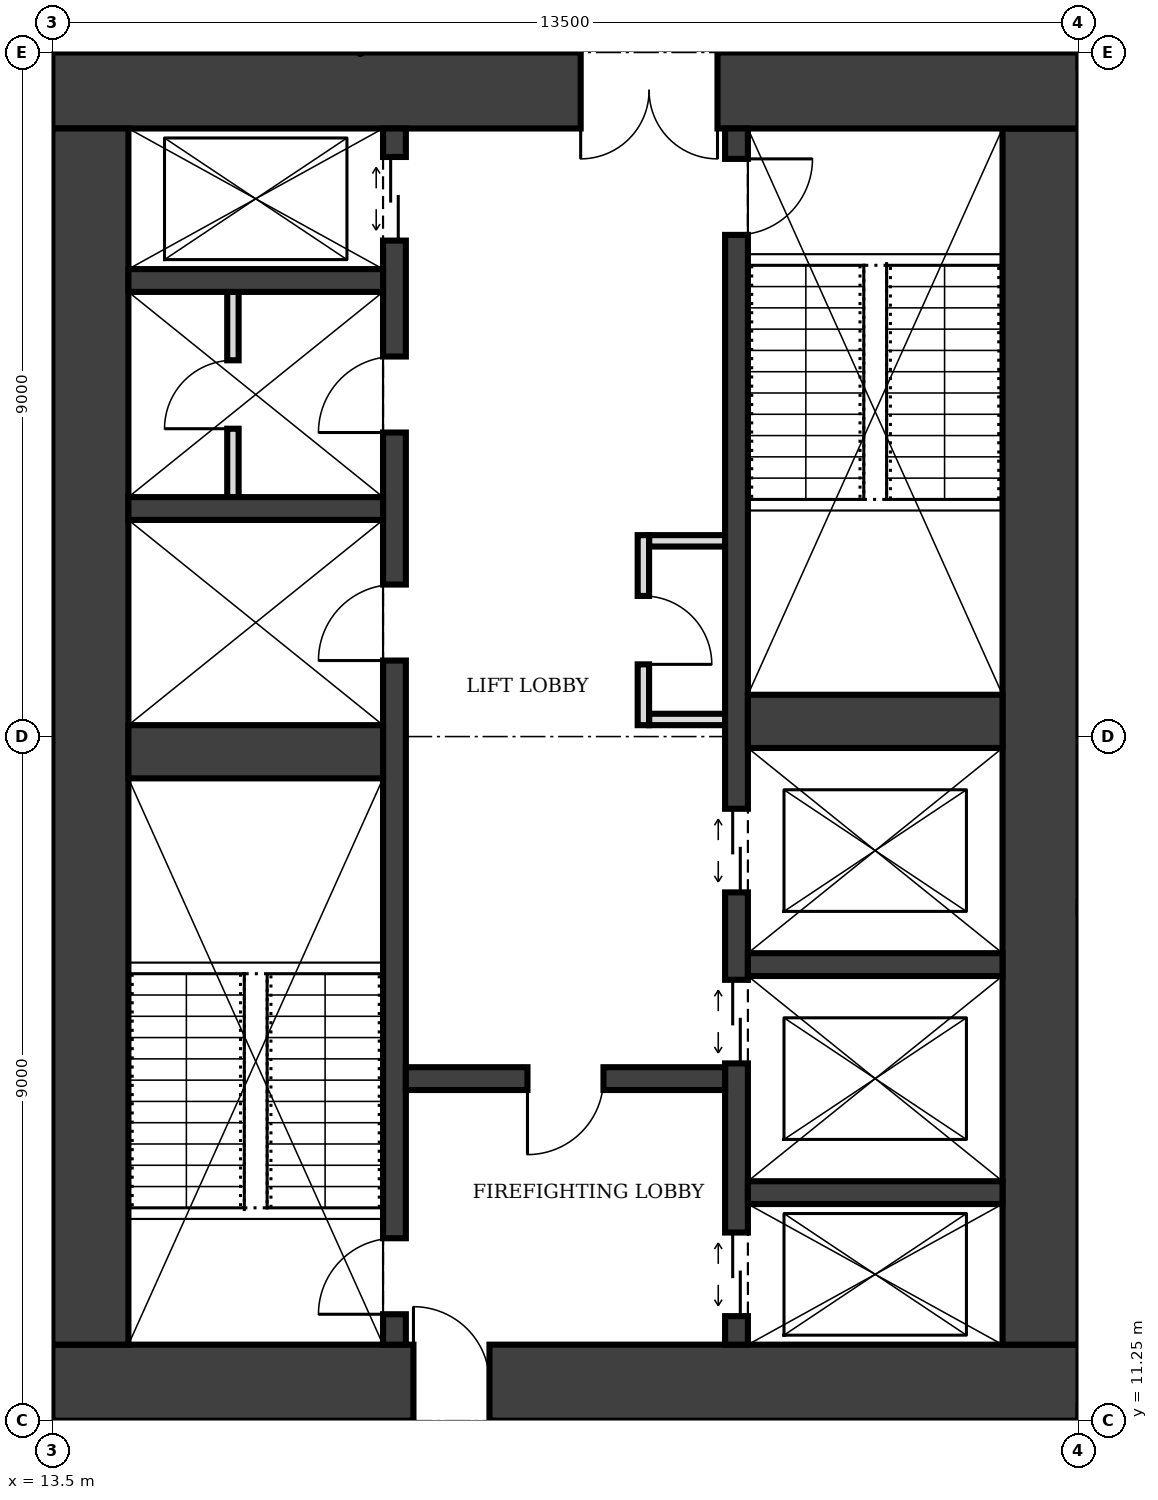
"""IFC4 building model, lengths in metres.
Left out: names, types, materials, properties, quantities, classifications, styles, units other than length and angle.
Written with IfcOpenShell. Run it as: python <this file> out.ifc"""

import sys

from ifc_helpers import new_model, si_unit, direction, frame, frame_2d, origin, place, context, subcontext, project, spatial, rectangle, extrude, element, fill, save


model = new_model("IFC4")
c1 = context("Model", 3, precision=1e-05, world=origin(), true_north=direction((0.0, 1.0)))
c2 = subcontext(c1, "Body", "Model", "MODEL_VIEW")
j1 = project(units=[si_unit("LENGTHUNIT", "METRE"), si_unit("PLANEANGLEUNIT", "RADIAN")], contexts=[c1])
p1 = place(None, origin())
s1 = spatial("IfcSite", under=j1, at=p1, CompositionType="ELEMENT")
p2 = place(p1, origin())
s2 = spatial("IfcBuilding", under=s1, at=p2, CompositionType="ELEMENT")
p3 = place(p2, frame((0.0, 0.0, 165.0)))
s3 = spatial("IfcBuildingStorey", under=s2, at=p3, CompositionType="ELEMENT", Elevation=165.0)
p4 = place(p3, frame((13.5, 11.75, 0.0), z_axis=(0.0, 0.0, 1.0), x_axis=(1.0, 0.0, 0.0)))
e1 = element("IfcWall", 1, at=p4, inside=s3, PredefinedType="SHEAR", context=c2, shape_type="SweptSolid", body=[
    extrude(rectangle(XDim=13.5, YDim=1.0, at=frame_2d((6.75, 0.0))), origin(), (0.0, 0.0, 1.0), 4.0),
])
p5 = place(p4, frame((4.75, 0.0, 0.0)))
e2 = element("IfcOpeningElement", 2, at=p5, cuts=e1, PredefinedType="OPENING", context=c2, shape_type="SweptSolid", body=[
    extrude(rectangle(XDim=1.0, YDim=2.1, at=frame_2d((0.5, 1.05))), frame((0.0, 0.51, 0.0), z_axis=(0.0, -1.0, 0.0), x_axis=(1.0, 0.0, 0.0)), (0.0, 0.0, 1.0), 1.02),
])
p6 = place(p3, frame((26.5, 12.25, 0.0), z_axis=(0.0, 0.0, 1.0), x_axis=(0.0, 1.0, 0.0)))
e3 = element("IfcWall", 3, at=p6, inside=s3, PredefinedType="SHEAR", context=c2, shape_type="SweptSolid", body=[
    extrude(rectangle(XDim=16.0, YDim=1.0, at=frame_2d((8.0, 0.0))), origin(), (0.0, 0.0, 1.0), 4.0),
])
p7 = place(p3, frame((27.0, 28.75, 0.0), z_axis=(0.0, 0.0, 1.0), x_axis=(-1.0, 0.0, 0.0)))
e4 = element("IfcWall", 4, at=p7, inside=s3, PredefinedType="SHEAR", context=c2, shape_type="SweptSolid", body=[
    extrude(rectangle(XDim=13.5, YDim=1.0, at=frame_2d((6.75, 0.0))), origin(), (0.0, 0.0, 1.0), 4.0),
])
p8 = place(p7, frame((4.75, 0.0, 0.0)))
e5 = element("IfcOpeningElement", 5, at=p8, cuts=e4, PredefinedType="OPENING", context=c2, shape_type="SweptSolid", body=[
    extrude(rectangle(XDim=1.8, YDim=2.1, at=frame_2d((0.9, 1.05))), frame((0.0, 0.51, 0.0), z_axis=(0.0, -1.0, 0.0), x_axis=(1.0, 0.0, 0.0)), (0.0, 0.0, 1.0), 1.02),
])
p9 = place(p3, frame((14.0, 28.25, 0.0), z_axis=(0.0, 0.0, 1.0), x_axis=(0.0, -1.0, 0.0)))
e6 = element("IfcWall", 6, at=p9, inside=s3, PredefinedType="SHEAR", context=c2, shape_type="SweptSolid", body=[
    extrude(rectangle(XDim=16.0, YDim=1.0, at=frame_2d((8.0, 0.0))), origin(), (0.0, 0.0, 1.0), 4.0),
])
p10 = place(p3, frame((18.0, 12.25, 0.0), z_axis=(0.0, 0.0, 1.0), x_axis=(0.0, 1.0, 0.0)))
e7 = element("IfcWall", 7, at=p10, inside=s3, PredefinedType="SHEAR", context=c2, shape_type="SweptSolid", body=[
    extrude(rectangle(XDim=16.0, YDim=0.3, at=frame_2d((8.0, 0.0))), origin(), (0.0, 0.0, 1.0), 4.0),
])
p11 = place(p10, frame((0.4, 0.0, 0.0)))
e8 = element("IfcOpeningElement", 8, at=p11, cuts=e7, PredefinedType="OPENING", context=c2, shape_type="SweptSolid", body=[
    extrude(rectangle(XDim=1.0, YDim=2.1, at=frame_2d((0.5, 1.05))), frame((0.0, 0.16, 0.0), z_axis=(0.0, -1.0, 0.0), x_axis=(1.0, 0.0, 0.0)), (0.0, 0.0, 1.0), 0.32),
])
p12 = place(p10, frame((14.525, 0.0, 0.0)))
e9 = element("IfcOpeningElement", 9, at=p12, cuts=e7, PredefinedType="OPENING", context=c2, shape_type="SweptSolid", body=[
    extrude(rectangle(XDim=1.1, YDim=2.1, at=frame_2d((0.55, 1.05))), frame((0.0, 0.16, 0.0), z_axis=(0.0, -1.0, 0.0), x_axis=(1.0, 0.0, 0.0)), (0.0, 0.0, 1.0), 0.32),
])
p13 = place(p10, frame((9.0, 0.0, 0.0)))
e10 = element("IfcOpeningElement", 10, at=p13, cuts=e7, PredefinedType="OPENING", context=c2, shape_type="SweptSolid", body=[
    extrude(rectangle(XDim=1.0, YDim=2.1, at=frame_2d((0.5, 1.05))), frame((0.0, 0.16, 0.0), z_axis=(0.0, -1.0, 0.0), x_axis=(1.0, 0.0, 0.0)), (0.0, 0.0, 1.0), 0.32),
])
p14 = place(p10, frame((12.0, 0.0, 0.0)))
e11 = element("IfcOpeningElement", 11, at=p14, cuts=e7, PredefinedType="OPENING", context=c2, shape_type="SweptSolid", body=[
    extrude(rectangle(XDim=1.0, YDim=2.1, at=frame_2d((0.5, 1.05))), frame((0.0, 0.16, 0.0), z_axis=(0.0, -1.0, 0.0), x_axis=(1.0, 0.0, 0.0)), (0.0, 0.0, 1.0), 0.32),
])
p15 = place(p3, frame((22.5, 12.25, 0.0), z_axis=(0.0, 0.0, 1.0), x_axis=(0.0, 1.0, 0.0)))
e12 = element("IfcWall", 12, at=p15, inside=s3, PredefinedType="SHEAR", context=c2, shape_type="SweptSolid", body=[
    extrude(rectangle(XDim=16.0, YDim=0.3, at=frame_2d((8.0, 0.0))), origin(), (0.0, 0.0, 1.0), 4.0),
])
p16 = place(p15, frame((14.6, 0.0, 0.0)))
e13 = element("IfcOpeningElement", 13, at=p16, cuts=e12, PredefinedType="OPENING", context=c2, shape_type="SweptSolid", body=[
    extrude(rectangle(XDim=1.0, YDim=2.1, at=frame_2d((0.5, 1.05))), frame((0.0, 0.16, 0.0), z_axis=(0.0, -1.0, 0.0), x_axis=(1.0, 0.0, 0.0)), (0.0, 0.0, 1.0), 0.32),
])
p17 = place(p15, frame((0.375, 0.0, 0.0)))
e14 = element("IfcOpeningElement", 14, at=p17, cuts=e12, PredefinedType="OPENING", context=c2, shape_type="SweptSolid", body=[
    extrude(rectangle(XDim=1.1, YDim=2.1, at=frame_2d((0.55, 1.05))), frame((0.0, 0.16, 0.0), z_axis=(0.0, -1.0, 0.0), x_axis=(1.0, 0.0, 0.0)), (0.0, 0.0, 1.0), 0.32),
])
p18 = place(p15, frame((3.7, 0.0, 0.0)))
e15 = element("IfcOpeningElement", 15, at=p18, cuts=e12, PredefinedType="OPENING", context=c2, shape_type="SweptSolid", body=[
    extrude(rectangle(XDim=1.1, YDim=2.1, at=frame_2d((0.55, 1.05))), frame((0.0, 0.16, 0.0), z_axis=(0.0, -1.0, 0.0), x_axis=(1.0, 0.0, 0.0)), (0.0, 0.0, 1.0), 0.32),
])
p19 = place(p15, frame((5.95, 0.0, 0.0)))
e16 = element("IfcOpeningElement", 16, at=p19, cuts=e12, PredefinedType="OPENING", context=c2, shape_type="SweptSolid", body=[
    extrude(rectangle(XDim=1.1, YDim=2.1, at=frame_2d((0.55, 1.05))), frame((0.0, 0.16, 0.0), z_axis=(0.0, -1.0, 0.0), x_axis=(1.0, 0.0, 0.0)), (0.0, 0.0, 1.0), 0.32),
])
p20 = place(p3, frame((14.5, 20.05, 0.0), z_axis=(0.0, 0.0, 1.0), x_axis=(1.0, 0.0, 0.0)))
e17 = element("IfcWall", 17, at=p20, inside=s3, PredefinedType="SHEAR", context=c2, shape_type="SweptSolid", body=[
    extrude(rectangle(XDim=3.35, YDim=0.7, at=frame_2d((1.675, 0.0))), origin(), (0.0, 0.0, 1.0), 4.0),
])
p21 = place(p3, frame((18.15, 15.75, 0.0), z_axis=(0.0, 0.0, 1.0), x_axis=(1.0, 0.0, 0.0)))
e18 = element("IfcWall", 18, at=p21, inside=s3, PredefinedType="SHEAR", context=c2, shape_type="SweptSolid", body=[
    extrude(rectangle(XDim=4.2, YDim=0.3, at=frame_2d((2.1, 0.0))), origin(), (0.0, 0.0, 1.0), 4.0),
])
p22 = place(p21, frame((1.6, 0.0, 0.0)))
e19 = element("IfcOpeningElement", 19, at=p22, cuts=e18, PredefinedType="OPENING", context=c2, shape_type="SweptSolid", body=[
    extrude(rectangle(XDim=1.0, YDim=2.1, at=frame_2d((0.5, 1.05))), frame((0.0, 0.16, 0.0), z_axis=(0.0, -1.0, 0.0), x_axis=(1.0, 0.0, 0.0)), (0.0, 0.0, 1.0), 0.32),
])
for number, where, z_axis, x_axis in (
    (20, (22.65, 14.25, 0.0), (0.0, 0.0, 1.0), (1.0, 0.0, 0.0)),
    (21, (22.65, 17.25, 0.0), (0.0, 0.0, 1.0), (1.0, 0.0, 0.0)),
):
    element("IfcWall", number, at=place(p3, frame(where, z_axis=z_axis, x_axis=x_axis)), inside=s3, PredefinedType="SHEAR", context=c2, shape_type="SweptSolid", body=[
        extrude(rectangle(XDim=3.35, YDim=0.3, at=frame_2d((1.675, 0.0))), origin(), (0.0, 0.0, 1.0), 4.0),
    ])
p23 = place(p3, frame((22.65, 20.45, 0.0), z_axis=(0.0, 0.0, 1.0), x_axis=(1.0, 0.0, 0.0)))
e22 = element("IfcWall", 22, at=p23, inside=s3, PredefinedType="SHEAR", context=c2, shape_type="SweptSolid", body=[
    extrude(rectangle(XDim=3.35, YDim=0.7, at=frame_2d((1.675, 0.0))), origin(), (0.0, 0.0, 1.0), 4.0),
])
for number, where, z_axis, x_axis in (
    (23, (14.5, 23.25, 0.0), (0.0, 0.0, 1.0), (1.0, 0.0, 0.0)),
    (24, (14.5, 26.25, 0.0), (0.0, 0.0, 1.0), (1.0, 0.0, 0.0)),
):
    element("IfcWall", number, at=place(p3, frame(where, z_axis=z_axis, x_axis=x_axis)), inside=s3, PredefinedType="SHEAR", context=c2, shape_type="SweptSolid", body=[
        extrude(rectangle(XDim=3.35, YDim=0.3, at=frame_2d((1.675, 0.0))), origin(), (0.0, 0.0, 1.0), 4.0),
    ])
p24 = place(p3, frame((21.275, 20.4, 0.0), z_axis=(0.0, 0.0, 1.0), x_axis=(0.0, 1.0, 0.0)))
e25 = element("IfcWall", 25, at=p24, inside=s3, PredefinedType="PARTITIONING", context=c2, shape_type="SweptSolid", body=[
    extrude(rectangle(XDim=2.5, YDim=0.15, at=frame_2d((1.25, 0.0))), origin(), (0.0, 0.0, 1.0), 3.75),
])
p25 = place(p24, frame((0.8, 0.0, 0.0)))
e26 = element("IfcOpeningElement", 26, at=p25, cuts=e25, PredefinedType="OPENING", context=c2, shape_type="SweptSolid", body=[
    extrude(rectangle(XDim=0.9, YDim=2.1, at=frame_2d((0.45, 1.05))), frame((0.0, 0.085, 0.0), z_axis=(0.0, -1.0, 0.0), x_axis=(1.0, 0.0, 0.0)), (0.0, 0.0, 1.0), 0.17),
])
for number, where, z_axis, x_axis in (
    (27, (21.35, 20.475, 0.0), (0.0, 0.0, 1.0), (1.0, 0.0, 0.0)),
    (28, (21.35, 22.825, 0.0), (0.0, 0.0, 1.0), (1.0, 0.0, 0.0)),
):
    element("IfcWall", number, at=place(p3, frame(where, z_axis=z_axis, x_axis=x_axis)), inside=s3, PredefinedType="PARTITIONING", context=c2, shape_type="SweptSolid", body=[
        extrude(rectangle(XDim=1.0, YDim=0.15, at=frame_2d((0.5, 0.0))), origin(), (0.0, 0.0, 1.0), 3.75),
    ])
p26 = place(p3, frame((15.875, 23.4, 0.0), z_axis=(0.0, 0.0, 1.0), x_axis=(0.0, 1.0, 0.0)))
e29 = element("IfcWall", 29, at=p26, inside=s3, PredefinedType="PARTITIONING", context=c2, shape_type="SweptSolid", body=[
    extrude(rectangle(XDim=2.7, YDim=0.15, at=frame_2d((1.35, 0.0))), origin(), (0.0, 0.0, 1.0), 3.75),
])
p27 = place(p26, frame((0.9, 0.0, 0.0)))
e30 = element("IfcOpeningElement", 30, at=p27, cuts=e29, PredefinedType="OPENING", context=c2, shape_type="SweptSolid", body=[
    extrude(rectangle(XDim=0.9, YDim=2.1, at=frame_2d((0.45, 1.05))), frame((0.0, 0.085, 0.0), z_axis=(0.0, -1.0, 0.0), x_axis=(1.0, 0.0, 0.0)), (0.0, 0.0, 1.0), 0.17),
])
for number, where, z_axis, x_axis in (
    (31, (27.0, 11.35, 0.0), (0.0, 0.0, 1.0), (1.0, 0.0, 0.0)),
    (32, (27.0, 29.15, 0.0), (0.0, 0.0, 1.0), (1.0, 0.0, 0.0)),
):
    element("IfcWall", number, at=place(p3, frame(where, z_axis=z_axis, x_axis=x_axis)), inside=s3, PredefinedType="SOLIDWALL", context=c2, shape_type="SweptSolid", body=[
        extrude(rectangle(XDim=7.93, YDim=0.2, at=frame_2d((3.965, 0.0))), origin(), (0.0, 0.0, 1.0), 3.75),
    ])
p28 = place(p5, origin())
e33 = element("IfcDoor", 33, at=p28, inside=s3, OperationType="SINGLE_SWING_LEFT", PredefinedType="DOOR", context=c2, shape_type="SweptSolid", body=[
    extrude(rectangle(XDim=1.0, YDim=2.1, at=frame_2d((0.5, 1.05))), frame((0.0, 0.025, 0.0), z_axis=(0.0, -1.0, 0.0), x_axis=(1.0, 0.0, 0.0)), (0.0, 0.0, 1.0), 0.05),
])
fill(e2, e33)
p29 = place(p8, origin())
e34 = element("IfcDoor", 34, at=p29, inside=s3, OperationType="DOUBLE_DOOR_SINGLE_SWING", PredefinedType="DOOR", context=c2, shape_type="SweptSolid", body=[
    extrude(rectangle(XDim=1.8, YDim=2.1, at=frame_2d((0.9, 1.05))), frame((0.0, 0.025, 0.0), z_axis=(0.0, -1.0, 0.0), x_axis=(1.0, 0.0, 0.0)), (0.0, 0.0, 1.0), 0.05),
])
fill(e5, e34)
p30 = place(p22, frame((1.0, 0.0, 0.0), z_axis=(0.0, 0.0, 1.0), x_axis=(-1.0, 0.0, 0.0)))
e35 = element("IfcDoor", 35, at=p30, inside=s3, OperationType="SINGLE_SWING_RIGHT", PredefinedType="DOOR", context=c2, shape_type="SweptSolid", body=[
    extrude(rectangle(XDim=1.0, YDim=2.1, at=frame_2d((0.5, 1.05))), frame((0.0, 0.025, 0.0), z_axis=(0.0, -1.0, 0.0), x_axis=(1.0, 0.0, 0.0)), (0.0, 0.0, 1.0), 0.05),
])
fill(e19, e35)
p31 = place(p11, origin())
e36 = element("IfcDoor", 36, at=p31, inside=s3, OperationType="SINGLE_SWING_LEFT", PredefinedType="DOOR", context=c2, shape_type="SweptSolid", body=[
    extrude(rectangle(XDim=1.0, YDim=2.1, at=frame_2d((0.5, 1.05))), frame((0.0, 0.025, 0.0), z_axis=(0.0, -1.0, 0.0), x_axis=(1.0, 0.0, 0.0)), (0.0, 0.0, 1.0), 0.05),
])
fill(e8, e36)
p32 = place(p16, frame((1.0, 0.0, 0.0), z_axis=(0.0, 0.0, 1.0), x_axis=(-1.0, 0.0, 0.0)))
e37 = element("IfcDoor", 37, at=p32, inside=s3, OperationType="SINGLE_SWING_LEFT", PredefinedType="DOOR", context=c2, shape_type="SweptSolid", body=[
    extrude(rectangle(XDim=1.0, YDim=2.1, at=frame_2d((0.5, 1.05))), frame((0.0, 0.025, 0.0), z_axis=(0.0, -1.0, 0.0), x_axis=(1.0, 0.0, 0.0)), (0.0, 0.0, 1.0), 0.05),
])
fill(e13, e37)
p33 = place(p17, origin())
e38 = element("IfcDoor", 38, at=p33, inside=s3, OperationType="DOUBLE_DOOR_SLIDING", PredefinedType="DOOR", context=c2, shape_type="SweptSolid", body=[
    extrude(rectangle(XDim=1.1, YDim=2.1, at=frame_2d((0.55, 1.05))), frame((0.0, 0.025, 0.0), z_axis=(0.0, -1.0, 0.0), x_axis=(1.0, 0.0, 0.0)), (0.0, 0.0, 1.0), 0.05),
])
fill(e14, e38)
p34 = place(p12, origin())
e39 = element("IfcDoor", 39, at=p34, inside=s3, OperationType="DOUBLE_DOOR_SLIDING", PredefinedType="DOOR", context=c2, shape_type="SweptSolid", body=[
    extrude(rectangle(XDim=1.1, YDim=2.1, at=frame_2d((0.55, 1.05))), frame((0.0, 0.025, 0.0), z_axis=(0.0, -1.0, 0.0), x_axis=(1.0, 0.0, 0.0)), (0.0, 0.0, 1.0), 0.05),
])
fill(e9, e39)
p35 = place(p18, origin())
e40 = element("IfcDoor", 40, at=p35, inside=s3, OperationType="DOUBLE_DOOR_SLIDING", PredefinedType="DOOR", context=c2, shape_type="SweptSolid", body=[
    extrude(rectangle(XDim=1.1, YDim=2.1, at=frame_2d((0.55, 1.05))), frame((0.0, 0.025, 0.0), z_axis=(0.0, -1.0, 0.0), x_axis=(1.0, 0.0, 0.0)), (0.0, 0.0, 1.0), 0.05),
])
fill(e15, e40)
p36 = place(p19, origin())
e41 = element("IfcDoor", 41, at=p36, inside=s3, OperationType="DOUBLE_DOOR_SLIDING", PredefinedType="DOOR", context=c2, shape_type="SweptSolid", body=[
    extrude(rectangle(XDim=1.1, YDim=2.1, at=frame_2d((0.55, 1.05))), frame((0.0, 0.025, 0.0), z_axis=(0.0, -1.0, 0.0), x_axis=(1.0, 0.0, 0.0)), (0.0, 0.0, 1.0), 0.05),
])
fill(e16, e41)
p37 = place(p25, frame((0.9, 0.0, 0.0), z_axis=(0.0, 0.0, 1.0), x_axis=(-1.0, 0.0, 0.0)))
e42 = element("IfcDoor", 42, at=p37, inside=s3, OperationType="SINGLE_SWING_RIGHT", PredefinedType="DOOR", context=c2, shape_type="SweptSolid", body=[
    extrude(rectangle(XDim=0.9, YDim=2.1, at=frame_2d((0.45, 1.05))), frame((0.0, 0.025, 0.0), z_axis=(0.0, -1.0, 0.0), x_axis=(1.0, 0.0, 0.0)), (0.0, 0.0, 1.0), 0.05),
])
fill(e26, e42)
p38 = place(p13, origin())
e43 = element("IfcDoor", 43, at=p38, inside=s3, OperationType="SINGLE_SWING_LEFT", PredefinedType="DOOR", context=c2, shape_type="SweptSolid", body=[
    extrude(rectangle(XDim=1.0, YDim=2.1, at=frame_2d((0.5, 1.05))), frame((0.0, 0.025, 0.0), z_axis=(0.0, -1.0, 0.0), x_axis=(1.0, 0.0, 0.0)), (0.0, 0.0, 1.0), 0.05),
])
fill(e10, e43)
p39 = place(p14, origin())
e44 = element("IfcDoor", 44, at=p39, inside=s3, OperationType="SINGLE_SWING_LEFT", PredefinedType="DOOR", context=c2, shape_type="SweptSolid", body=[
    extrude(rectangle(XDim=1.0, YDim=2.1, at=frame_2d((0.5, 1.05))), frame((0.0, 0.025, 0.0), z_axis=(0.0, -1.0, 0.0), x_axis=(1.0, 0.0, 0.0)), (0.0, 0.0, 1.0), 0.05),
])
fill(e11, e44)
p40 = place(p27, origin())
e45 = element("IfcDoor", 45, at=p40, inside=s3, OperationType="SINGLE_SWING_LEFT", PredefinedType="DOOR", context=c2, shape_type="SweptSolid", body=[
    extrude(rectangle(XDim=0.9, YDim=2.1, at=frame_2d((0.45, 1.05))), frame((0.0, 0.025, 0.0), z_axis=(0.0, -1.0, 0.0), x_axis=(1.0, 0.0, 0.0)), (0.0, 0.0, 1.0), 0.05),
])
fill(e30, e45)
save(model, sys.argv[1])
